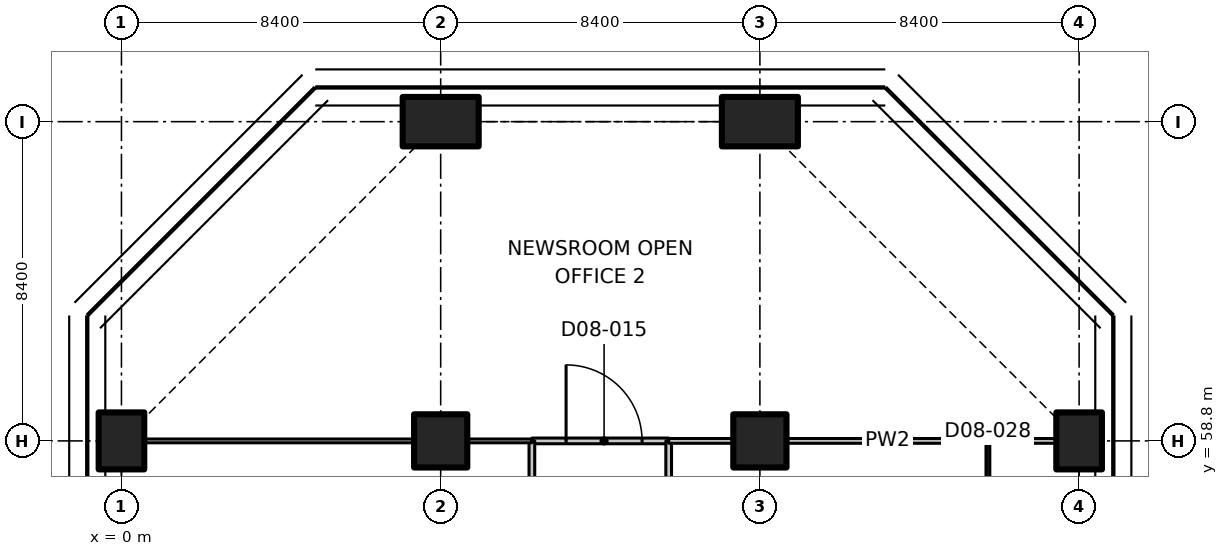
"""IFC4 building model, lengths in metres.
Left out: names, types, materials, properties, quantities, classifications, styles, units other than length and angle.
Written with IfcOpenShell. Run it as: python <this file> out.ifc"""

import sys

from ifc_helpers import new_model, si_unit, direction, frame, frame_2d, origin, origin_2d, place, context, subcontext, project, spatial, rectangle, extrude, element, fill, save


model = new_model("IFC4")
c1 = context("Model", 3, precision=1e-05, world=origin(), true_north=direction((0.0, 1.0)))
c2 = subcontext(c1, "Body", "Model", "MODEL_VIEW")
j1 = project(units=[si_unit("LENGTHUNIT", "METRE"), si_unit("PLANEANGLEUNIT", "RADIAN")], contexts=[c1])
p1 = place(None, origin())
s1 = spatial("IfcSite", under=j1, at=p1, CompositionType="ELEMENT")
p2 = place(p1, origin())
s2 = spatial("IfcBuilding", under=s1, at=p2, CompositionType="ELEMENT")
p3 = place(p2, frame((0.0, 0.0, 50.9)))
s3 = spatial("IfcBuildingStorey", under=s2, at=p3, CompositionType="ELEMENT", Elevation=50.9)
p4 = place(p3, frame((0.0, 58.8, 0.0), z_axis=(0.0, 0.0, 1.0), x_axis=(1.0, 0.0, 0.0)))
e1 = element("IfcColumn", 1, at=p4, inside=s3, PredefinedType="COLUMN", context=c2, shape_type="SweptSolid", body=[
    extrude(rectangle(XDim=1.2, YDim=1.5, at=origin_2d()), origin(), (0.0, 0.0, 1.0), 3.35),
])
p5 = place(p3, frame((8.4, 58.8, 0.0), z_axis=(0.0, 0.0, 1.0), x_axis=(1.0, 0.0, 0.0)))
e2 = element("IfcColumn", 2, at=p5, inside=s3, PredefinedType="COLUMN", context=c2, shape_type="SweptSolid", body=[
    extrude(rectangle(XDim=1.4, YDim=1.4, at=origin_2d()), origin(), (0.0, 0.0, 1.0), 3.35),
])
p6 = place(p3, frame((8.4, 67.2, 0.0), z_axis=(0.0, 0.0, 1.0), x_axis=(0.0, 1.0, 0.0)))
e3 = element("IfcColumn", 3, at=p6, inside=s3, PredefinedType="COLUMN", context=c2, shape_type="SweptSolid", body=[
    extrude(rectangle(XDim=1.3, YDim=2.0, at=origin_2d()), origin(), (0.0, 0.0, 1.0), 3.35),
])
p7 = place(p3, frame((16.8, 58.8, 0.0), z_axis=(0.0, 0.0, 1.0), x_axis=(1.0, 0.0, 0.0)))
e4 = element("IfcColumn", 4, at=p7, inside=s3, PredefinedType="COLUMN", context=c2, shape_type="SweptSolid", body=[
    extrude(rectangle(XDim=1.4, YDim=1.4, at=origin_2d()), origin(), (0.0, 0.0, 1.0), 3.35),
])
p8 = place(p3, frame((16.8, 67.2, 0.0), z_axis=(0.0, 0.0, 1.0), x_axis=(0.0, 1.0, 0.0)))
e5 = element("IfcColumn", 5, at=p8, inside=s3, PredefinedType="COLUMN", context=c2, shape_type="SweptSolid", body=[
    extrude(rectangle(XDim=1.3, YDim=2.0, at=origin_2d()), origin(), (0.0, 0.0, 1.0), 3.35),
])
p9 = place(p3, frame((25.2, 58.8, 0.0), z_axis=(0.0, 0.0, 1.0), x_axis=(1.0, 0.0, 0.0)))
e6 = element("IfcColumn", 6, at=p9, inside=s3, PredefinedType="COLUMN", context=c2, shape_type="SweptSolid", body=[
    extrude(rectangle(XDim=1.2, YDim=1.5, at=origin_2d()), origin(), (0.0, 0.0, 1.0), 3.35),
])
p10 = place(p3, frame((10.8, 58.8, 0.0), z_axis=(0.0, 0.0, 1.0), x_axis=(1.0, 0.0, 0.0)))
e7 = element("IfcWall", 7, at=p10, inside=s3, PredefinedType="PARTITIONING", context=c2, shape_type="SweptSolid", body=[
    extrude(rectangle(XDim=3.6, YDim=0.15, at=frame_2d((1.8, 0.0))), origin(), (0.0, 0.0, 1.0), 3.33),
])
p11 = place(p10, frame((0.9, 0.0, 0.0)))
e8 = element("IfcOpeningElement", 8, at=p11, cuts=e7, PredefinedType="OPENING", context=c2, shape_type="SweptSolid", body=[
    extrude(rectangle(XDim=2.0, YDim=2.4, at=frame_2d((1.0, 1.2))), frame((0.0, 0.085, 0.0), z_axis=(0.0, -1.0, 0.0), x_axis=(1.0, 0.0, 0.0)), (0.0, 0.0, 1.0), 0.17),
])
p12 = place(p3, frame((10.8, 50.4, 0.0), z_axis=(0.0, 0.0, 1.0), x_axis=(0.0, 1.0, 0.0)))
e9 = element("IfcWall", 9, at=p12, inside=s3, PredefinedType="PARTITIONING", context=c2, shape_type="SweptSolid", body=[
    extrude(rectangle(XDim=8.4, YDim=0.15, at=frame_2d((4.2, 0.0))), origin(), (0.0, 0.0, 1.0), 3.33),
])
p13 = place(p12, frame((3.3, 0.0, 0.0)))
e10 = element("IfcOpeningElement", 10, at=p13, cuts=e9, PredefinedType="OPENING", context=c2, shape_type="SweptSolid", body=[
    extrude(rectangle(XDim=1.6, YDim=2.1, at=frame_2d((0.8, 1.05))), frame((0.0, 0.085, 0.0), z_axis=(0.0, -1.0, 0.0), x_axis=(1.0, 0.0, 0.0)), (0.0, 0.0, 1.0), 0.17),
])
p14 = place(p3, frame((14.4, 58.8, 0.0), z_axis=(0.0, 0.0, 1.0), x_axis=(0.0, -1.0, 0.0)))
e11 = element("IfcWall", 11, at=p14, inside=s3, PredefinedType="PARTITIONING", context=c2, shape_type="SweptSolid", body=[
    extrude(rectangle(XDim=4.2, YDim=0.15, at=frame_2d((2.1, 0.0))), origin(), (0.0, 0.0, 1.0), 3.33),
])
p15 = place(p3, frame((10.8, 58.8, 0.0), z_axis=(0.0, 0.0, 1.0), x_axis=(-1.0, 0.0, 0.0)))
e12 = element("IfcWall", 12, at=p15, inside=s3, PredefinedType="PARTITIONING", context=c2, shape_type="SweptSolid", body=[
    extrude(rectangle(XDim=1.68, YDim=0.1, at=frame_2d((0.84, 0.0))), origin(), (0.0, 0.0, 1.0), 3.33),
])
p16 = place(p3, frame((7.68, 58.8, 0.0), z_axis=(0.0, 0.0, 1.0), x_axis=(-1.0, 0.0, 0.0)))
e13 = element("IfcWall", 13, at=p16, inside=s3, PredefinedType="PARTITIONING", context=c2, shape_type="SweptSolid", body=[
    extrude(rectangle(XDim=7.06, YDim=0.1, at=frame_2d((3.53, 0.0))), origin(), (0.0, 0.0, 1.0), 3.33),
])
p17 = place(p3, frame((22.8, 58.8, 0.0), z_axis=(0.0, 0.0, 1.0), x_axis=(-1.0, 0.0, 0.0)))
e14 = element("IfcWall", 14, at=p17, inside=s3, PredefinedType="PARTITIONING", context=c2, shape_type="SweptSolid", body=[
    extrude(rectangle(XDim=5.28, YDim=0.125, at=frame_2d((2.64, 0.0))), origin(), (0.0, 0.0, 1.0), 3.33),
])
p18 = place(p3, frame((16.08, 58.8, 0.0), z_axis=(0.0, 0.0, 1.0), x_axis=(-1.0, 0.0, 0.0)))
e15 = element("IfcWall", 15, at=p18, inside=s3, PredefinedType="PARTITIONING", context=c2, shape_type="SweptSolid", body=[
    extrude(rectangle(XDim=1.68, YDim=0.125, at=frame_2d((0.84, 0.0))), origin(), (0.0, 0.0, 1.0), 3.33),
])
p19 = place(p3, frame((24.58, 58.8, 0.0), z_axis=(0.0, 0.0, 1.0), x_axis=(-1.0, 0.0, 0.0)))
e16 = element("IfcWall", 16, at=p19, inside=s3, PredefinedType="PARTITIONING", context=c2, shape_type="SweptSolid", body=[
    extrude(rectangle(XDim=1.78, YDim=0.125, at=frame_2d((0.89, 0.0))), origin(), (0.0, 0.0, 1.0), 3.33),
])
p20 = place(p3, frame((22.8, 58.8, 0.0), z_axis=(0.0, 0.0, 1.0), x_axis=(0.0, -1.0, 0.0)))
e17 = element("IfcWall", 17, at=p20, inside=s3, PredefinedType="PARTITIONING", context=c2, shape_type="SweptSolid", body=[
    extrude(rectangle(XDim=4.2, YDim=0.1, at=frame_2d((2.1, 0.0))), origin(), (0.0, 0.0, 1.0), 3.33),
])
p21 = place(p20, frame((1.5, 0.0, 0.0)))
e18 = element("IfcOpeningElement", 18, at=p21, cuts=e17, PredefinedType="OPENING", context=c2, shape_type="SweptSolid", body=[
    extrude(rectangle(XDim=0.9, YDim=2.1, at=frame_2d((0.45, 1.05))), frame((0.0, 0.06, 0.0), z_axis=(0.0, -1.0, 0.0), x_axis=(1.0, 0.0, 0.0)), (0.0, 0.0, 1.0), 0.12),
])
p22 = place(p11, origin())
e19 = element("IfcDoor", 19, at=p22, inside=s3, OperationType="DOUBLE_DOOR_SINGLE_SWING", PredefinedType="DOOR", context=c2, shape_type="SweptSolid", body=[
    extrude(rectangle(XDim=2.0, YDim=2.4, at=frame_2d((1.0, 1.2))), frame((0.0, 0.025, 0.0), z_axis=(0.0, -1.0, 0.0), x_axis=(1.0, 0.0, 0.0)), (0.0, 0.0, 1.0), 0.05),
])
fill(e8, e19)
save(model, sys.argv[1])
